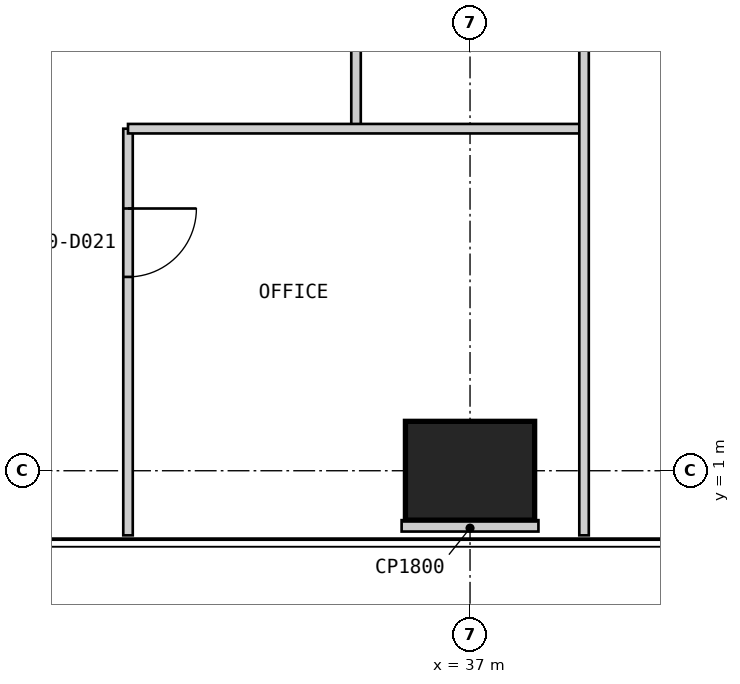
"""IFC4 building model, lengths in metres.
Left out: names, types, materials, properties, quantities, classifications, styles, units other than length and angle.
Written with IfcOpenShell. Run it as: python <this file> out.ifc"""

import sys

from ifc_helpers import new_model, si_unit, direction, frame, frame_2d, origin, origin_2d, place, context, subcontext, project, spatial, rectangle, extrude, element, fill, save


model = new_model("IFC4")
c1 = context("Model", 3, precision=1e-05, world=origin(), true_north=direction((0.0, 1.0)))
c2 = subcontext(c1, "Body", "Model", "MODEL_VIEW")
j1 = project(units=[si_unit("LENGTHUNIT", "METRE"), si_unit("PLANEANGLEUNIT", "RADIAN")], contexts=[c1])
p1 = place(None, origin())
s1 = spatial("IfcSite", under=j1, at=p1, CompositionType="ELEMENT")
p2 = place(p1, origin())
s2 = spatial("IfcBuilding", under=s1, at=p2, CompositionType="ELEMENT")
p3 = place(p2, frame((0.0, 0.0, 213.8)))
s3 = spatial("IfcBuildingStorey", under=s2, at=p3, CompositionType="ELEMENT", Elevation=213.8)
p4 = place(p3, frame((37.0, 1.0, 0.0), z_axis=(0.0, 0.0, 1.0), x_axis=(1.0, 0.0, 0.0)))
e1 = element("IfcColumn", 1, at=p4, inside=s3, PredefinedType="COLUMN", context=c2, shape_type="SweptSolid", body=[
    extrude(rectangle(XDim=1.7, YDim=1.3, at=origin_2d()), origin(), (0.0, 0.0, 1.0), 4.0),
])
p5 = place(p3, frame((32.5, 0.15, 0.0), z_axis=(0.0, 0.0, 1.0), x_axis=(0.0, 1.0, 0.0)))
e2 = element("IfcWall", 2, at=p5, inside=s3, PredefinedType="PARTITIONING", context=c2, shape_type="SweptSolid", body=[
    extrude(rectangle(XDim=5.35, YDim=0.125, at=frame_2d((2.675, 0.0))), origin(), (0.0, 0.0, 1.0), 3.85),
])
p6 = place(p5, frame((3.4, 0.0, 0.0)))
e3 = element("IfcOpeningElement", 3, at=p6, cuts=e2, PredefinedType="OPENING", context=c2, shape_type="SweptSolid", body=[
    extrude(rectangle(XDim=0.9, YDim=2.2, at=frame_2d((0.45, 1.1))), frame((0.0, 0.073, 0.0), z_axis=(0.0, -1.0, 0.0), x_axis=(1.0, 0.0, 0.0)), (0.0, 0.0, 1.0), 0.145),
])
p7 = place(p3, frame((35.5, 5.5, 0.0), z_axis=(0.0, 0.0, 1.0), x_axis=(0.0, 1.0, 0.0)))
e4 = element("IfcWall", 4, at=p7, inside=s3, PredefinedType="PARTITIONING", context=c2, shape_type="SweptSolid", body=[
    extrude(rectangle(XDim=6.0, YDim=0.125, at=frame_2d((3.0, 0.0))), origin(), (0.0, 0.0, 1.0), 3.85),
])
p8 = place(p7, frame((2.55, 0.0, 0.0)))
e5 = element("IfcOpeningElement", 5, at=p8, cuts=e4, PredefinedType="OPENING", context=c2, shape_type="SweptSolid", body=[
    extrude(rectangle(XDim=0.9, YDim=2.2, at=frame_2d((0.45, 1.1))), frame((0.0, 0.073, 0.0), z_axis=(0.0, -1.0, 0.0), x_axis=(1.0, 0.0, 0.0)), (0.0, 0.0, 1.0), 0.145),
])
p9 = place(p3, frame((32.5, 5.5, 0.0), z_axis=(0.0, 0.0, 1.0), x_axis=(1.0, 0.0, 0.0)))
e6 = element("IfcWall", 6, at=p9, inside=s3, PredefinedType="PARTITIONING", context=c2, shape_type="SweptSolid", body=[
    extrude(rectangle(XDim=6.0, YDim=0.125, at=frame_2d((3.0, 0.0))), origin(), (0.0, 0.0, 1.0), 3.85),
])
p10 = place(p3, frame((38.5, 0.15, 0.0), z_axis=(0.0, 0.0, 1.0), x_axis=(0.0, 1.0, 0.0)))
e7 = element("IfcWall", 7, at=p10, inside=s3, PredefinedType="PARTITIONING", context=c2, shape_type="SweptSolid", body=[
    extrude(rectangle(XDim=11.35, YDim=0.125, at=frame_2d((5.675, 0.0))), origin(), (0.0, 0.0, 1.0), 3.85),
])
p11 = place(p3, frame((37.0, 0.2, 0.0), z_axis=(0.0, 0.0, 1.0), x_axis=(0.0, 1.0, 0.0)))
e8 = element("IfcWall", 8, at=p11, inside=s3, PredefinedType="PARTITIONING", context=c2, shape_type="SweptSolid", body=[
    extrude(rectangle(XDim=0.15, YDim=1.8, at=frame_2d((0.075, 0.0))), origin(), (0.0, 0.0, 1.0), 3.85),
])
p12 = place(p6, frame((0.9, 0.0, 0.0), z_axis=(0.0, 0.0, 1.0), x_axis=(-1.0, 0.0, 0.0)))
e9 = element("IfcDoor", 9, at=p12, inside=s3, OperationType="SINGLE_SWING_LEFT", PredefinedType="DOOR", context=c2, shape_type="SweptSolid", body=[
    extrude(rectangle(XDim=0.9, YDim=2.2, at=frame_2d((0.45, 1.1))), frame((0.0, 0.025, 0.0), z_axis=(0.0, -1.0, 0.0), x_axis=(1.0, 0.0, 0.0)), (0.0, 0.0, 1.0), 0.05),
])
fill(e3, e9)
save(model, sys.argv[1])
